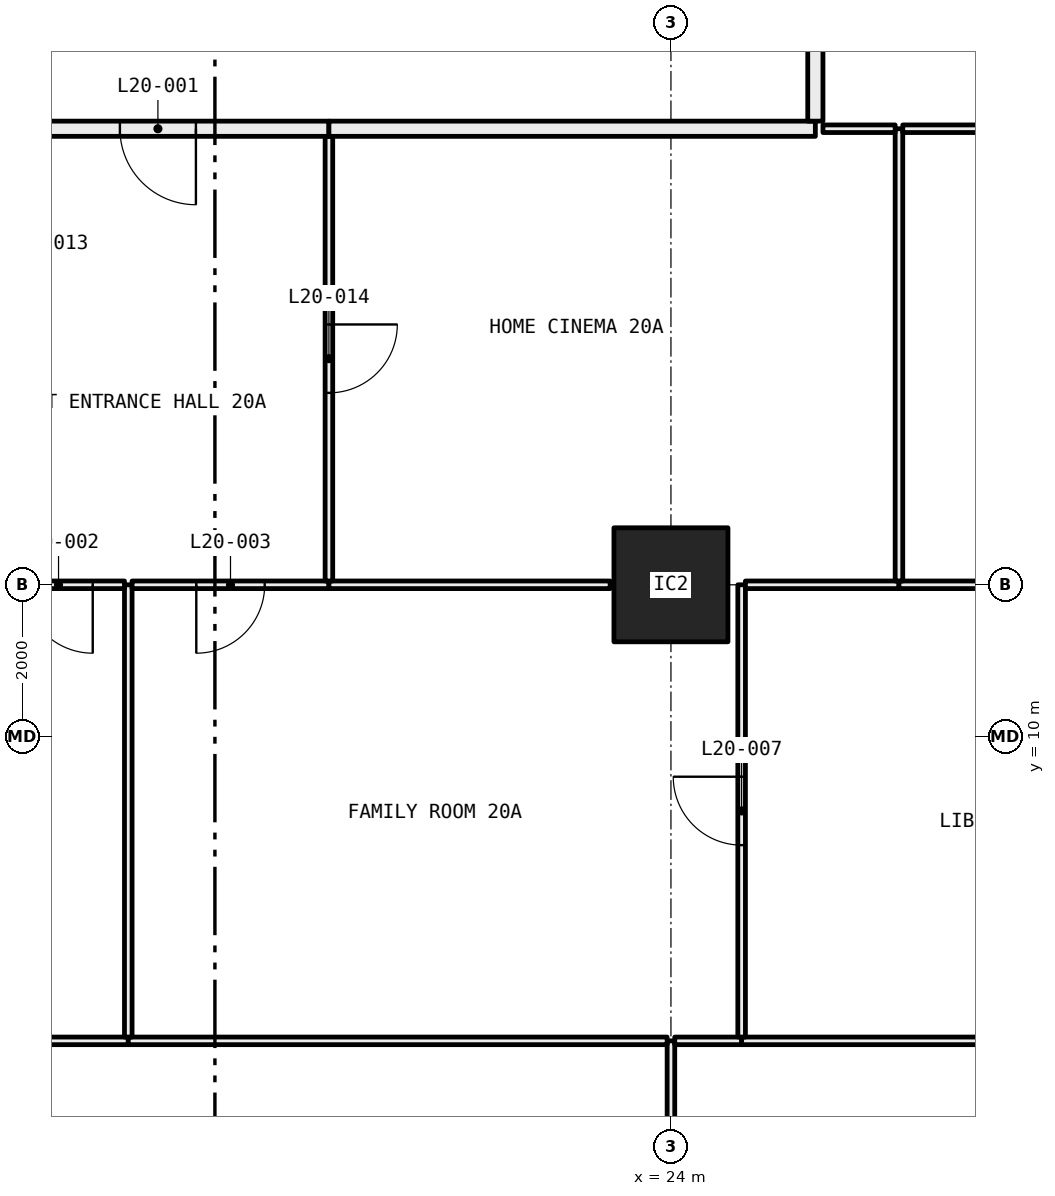
"""IFC4 building model, lengths in metres.
Left out: names, types, materials, properties, quantities, classifications, styles, units other than length and angle.
Written with IfcOpenShell. Run it as: python <this file> out.ifc"""

import sys

from ifc_helpers import new_model, si_unit, direction, frame, frame_2d, origin, origin_2d, place, context, subcontext, project, spatial, rectangle, hollow_rectangle, extrude, element, fill, save


model = new_model("IFC4")
c1 = context("Model", 3, precision=1e-05, world=origin(), true_north=direction((0.0, 1.0)))
c2 = subcontext(c1, "Body", "Model", "MODEL_VIEW")
j1 = project(units=[si_unit("LENGTHUNIT", "METRE"), si_unit("PLANEANGLEUNIT", "RADIAN")], contexts=[c1])
p1 = place(None, origin())
s1 = spatial("IfcSite", under=j1, at=p1, CompositionType="ELEMENT")
p2 = place(p1, origin())
s2 = spatial("IfcBuilding", under=s1, at=p2, CompositionType="ELEMENT")
p3 = place(p2, frame((0.0, 0.0, 81.75)))
s3 = spatial("IfcBuildingStorey", under=s2, at=p3, CompositionType="ELEMENT", Elevation=81.75)
p4 = place(p3, frame((24.0, 12.0, 0.0), z_axis=(0.0, 0.0, 1.0), x_axis=(1.0, 0.0, 0.0)))
e1 = element("IfcColumn", 1, at=p4, inside=s3, PredefinedType="COLUMN", context=c2, shape_type="SweptSolid", body=[
    extrude(hollow_rectangle(XDim=1.5, YDim=1.5, WallThickness=0.065, at=origin_2d()), origin(), (0.0, 0.0, 1.0), 3.05),
])
p5 = place(p3, frame((24.0, 0.72, 0.0), z_axis=(0.0, 0.0, 1.0), x_axis=(0.0, 1.0, 0.0)))
e2 = element("IfcWall", 2, at=p5, inside=s3, PredefinedType="PARTITIONING", context=c2, shape_type="SweptSolid", body=[
    extrude(rectangle(XDim=5.28, YDim=0.1, at=frame_2d((2.64, 0.0))), origin(), (0.0, 0.0, 1.0), 2.45),
])
p6 = place(p5, frame((2.19, 0.0, 0.0)))
e3 = element("IfcOpeningElement", 3, at=p6, cuts=e2, PredefinedType="OPENING", context=c2, shape_type="SweptSolid", body=[
    extrude(rectangle(XDim=0.9, YDim=2.1, at=frame_2d((0.45, 1.05))), frame((0.0, 0.06, 0.0), z_axis=(0.0, -1.0, 0.0), x_axis=(1.0, 0.0, 0.0)), (0.0, 0.0, 1.0), 0.12),
])
p7 = place(p3, frame((16.86, 6.0, 0.0), z_axis=(0.0, 0.0, 1.0), x_axis=(-1.0, 0.0, 0.0)))
e4 = element("IfcWall", 4, at=p7, inside=s3, PredefinedType="PARTITIONING", context=c2, shape_type="SweptSolid", body=[
    extrude(rectangle(XDim=4.81, YDim=0.1, at=frame_2d((2.405, 0.0))), origin(), (0.0, 0.0, 1.0), 2.45),
])
p8 = place(p7, frame((1.955, 0.0, 0.0)))
e5 = element("IfcOpeningElement", 5, at=p8, cuts=e4, PredefinedType="OPENING", context=c2, shape_type="SweptSolid", body=[
    extrude(rectangle(XDim=0.9, YDim=2.1, at=frame_2d((0.45, 1.05))), frame((0.0, 0.06, 0.0), z_axis=(0.0, -1.0, 0.0), x_axis=(1.0, 0.0, 0.0)), (0.0, 0.0, 1.0), 0.12),
])
p9 = place(p3, frame((23.95, 6.0, 0.0), z_axis=(0.0, 0.0, 1.0), x_axis=(-1.0, 0.0, 0.0)))
e6 = element("IfcWall", 6, at=p9, inside=s3, PredefinedType="PARTITIONING", context=c2, shape_type="SweptSolid", body=[
    extrude(rectangle(XDim=7.09, YDim=0.1, at=frame_2d((3.545, 0.0))), origin(), (0.0, 0.0, 1.0), 2.45),
])
p10 = place(p3, frame((24.93, 6.0, 0.0), z_axis=(0.0, 0.0, 1.0), x_axis=(-1.0, 0.0, 0.0)))
e7 = element("IfcWall", 7, at=p10, inside=s3, PredefinedType="PARTITIONING", context=c2, shape_type="SweptSolid", body=[
    extrude(rectangle(XDim=0.88, YDim=0.1, at=frame_2d((0.44, 0.0))), origin(), (0.0, 0.0, 1.0), 2.45),
])
p11 = place(p3, frame((29.95, 6.0, 0.0), z_axis=(0.0, 0.0, 1.0), x_axis=(-1.0, 0.0, 0.0)))
e8 = element("IfcWall", 8, at=p11, inside=s3, PredefinedType="PARTITIONING", context=c2, shape_type="SweptSolid", body=[
    extrude(rectangle(XDim=5.02, YDim=0.1, at=frame_2d((2.51, 0.0))), origin(), (0.0, 0.0, 1.0), 3.05),
])
p12 = place(p3, frame((16.86, 6.05, 0.0), z_axis=(0.0, 0.0, 1.0), x_axis=(0.0, 1.0, 0.0)))
e9 = element("IfcWall", 9, at=p12, inside=s3, PredefinedType="PARTITIONING", context=c2, shape_type="SweptSolid", body=[
    extrude(rectangle(XDim=5.95, YDim=0.1, at=frame_2d((2.975, 0.0))), origin(), (0.0, 0.0, 1.0), 2.45),
])
p13 = place(p3, frame((16.81, 12.0, 0.0), z_axis=(0.0, 0.0, 1.0), x_axis=(-1.0, 0.0, 0.0)))
e10 = element("IfcWall", 10, at=p13, inside=s3, PredefinedType="PARTITIONING", context=c2, shape_type="SweptSolid", body=[
    extrude(rectangle(XDim=1.735, YDim=0.1, at=frame_2d((0.868, 0.0))), origin(), (0.0, 0.0, 1.0), 2.45),
])
p14 = place(p13, frame((0.417, 0.0, 0.0)))
e11 = element("IfcOpeningElement", 11, at=p14, cuts=e10, PredefinedType="OPENING", context=c2, shape_type="SweptSolid", body=[
    extrude(rectangle(XDim=0.9, YDim=2.1, at=frame_2d((0.45, 1.05))), frame((0.0, 0.06, 0.0), z_axis=(0.0, -1.0, 0.0), x_axis=(1.0, 0.0, 0.0)), (0.0, 0.0, 1.0), 0.12),
])
p15 = place(p3, frame((24.93, 6.05, 0.0), z_axis=(0.0, 0.0, 1.0), x_axis=(0.0, 1.0, 0.0)))
e12 = element("IfcWall", 12, at=p15, inside=s3, PredefinedType="PARTITIONING", context=c2, shape_type="SweptSolid", body=[
    extrude(rectangle(XDim=5.95, YDim=0.1, at=frame_2d((2.975, 0.0))), origin(), (0.0, 0.0, 1.0), 2.45),
])
p16 = place(p15, frame((2.525, 0.0, 0.0)))
e13 = element("IfcOpeningElement", 13, at=p16, cuts=e12, PredefinedType="OPENING", context=c2, shape_type="SweptSolid", body=[
    extrude(rectangle(XDim=0.9, YDim=2.1, at=frame_2d((0.45, 1.05))), frame((0.0, 0.06, 0.0), z_axis=(0.0, -1.0, 0.0), x_axis=(1.0, 0.0, 0.0)), (0.0, 0.0, 1.0), 0.12),
])
p17 = place(p3, frame((19.5, 12.0, 0.0), z_axis=(0.0, 0.0, 1.0), x_axis=(-1.0, 0.0, 0.0)))
e14 = element("IfcWall", 14, at=p17, inside=s3, PredefinedType="PARTITIONING", context=c2, shape_type="SweptSolid", body=[
    extrude(rectangle(XDim=2.59, YDim=0.1, at=frame_2d((1.295, 0.0))), origin(), (0.0, 0.0, 1.0), 2.45),
])
p18 = place(p17, frame((0.845, 0.0, 0.0)))
e15 = element("IfcOpeningElement", 15, at=p18, cuts=e14, PredefinedType="OPENING", context=c2, shape_type="SweptSolid", body=[
    extrude(rectangle(XDim=0.9, YDim=2.1, at=frame_2d((0.45, 1.05))), frame((0.0, 0.06, 0.0), z_axis=(0.0, -1.0, 0.0), x_axis=(1.0, 0.0, 0.0)), (0.0, 0.0, 1.0), 0.12),
])
p19 = place(p3, frame((23.2, 12.0, 0.0), z_axis=(0.0, 0.0, 1.0), x_axis=(-1.0, 0.0, 0.0)))
e16 = element("IfcWall", 16, at=p19, inside=s3, PredefinedType="PARTITIONING", context=c2, shape_type="SweptSolid", body=[
    extrude(rectangle(XDim=3.7, YDim=0.1, at=frame_2d((1.85, 0.0))), origin(), (0.0, 0.0, 1.0), 2.45),
])
p20 = place(p3, frame((27.0, 12.0, 0.0), z_axis=(0.0, 0.0, 1.0), x_axis=(-1.0, 0.0, 0.0)))
e17 = element("IfcWall", 17, at=p20, inside=s3, PredefinedType="PARTITIONING", context=c2, shape_type="SweptSolid", body=[
    extrude(rectangle(XDim=2.02, YDim=0.1, at=frame_2d((1.01, 0.0))), origin(), (0.0, 0.0, 1.0), 2.45),
])
p21 = place(p3, frame((32.95, 12.0, 0.0), z_axis=(0.0, 0.0, 1.0), x_axis=(-1.0, 0.0, 0.0)))
e18 = element("IfcWall", 18, at=p21, inside=s3, PredefinedType="PARTITIONING", context=c2, shape_type="SweptSolid", body=[
    extrude(rectangle(XDim=5.95, YDim=0.1, at=frame_2d((2.975, 0.0))), origin(), (0.0, 0.0, 1.0), 2.45),
])
p22 = place(p21, frame((2.525, 0.0, 0.0)))
e19 = element("IfcOpeningElement", 19, at=p22, cuts=e18, PredefinedType="OPENING", context=c2, shape_type="SweptSolid", body=[
    extrude(rectangle(XDim=0.9, YDim=2.1, at=frame_2d((0.45, 1.05))), frame((0.0, 0.06, 0.0), z_axis=(0.0, -1.0, 0.0), x_axis=(1.0, 0.0, 0.0)), (0.0, 0.0, 1.0), 0.12),
])
p23 = place(p3, frame((19.5, 12.05, 0.0), z_axis=(0.0, 0.0, 1.0), x_axis=(0.0, 1.0, 0.0)))
e20 = element("IfcWall", 20, at=p23, inside=s3, PredefinedType="PARTITIONING", context=c2, shape_type="SweptSolid", body=[
    extrude(rectangle(XDim=5.85, YDim=0.1, at=frame_2d((2.925, 0.0))), origin(), (0.0, 0.0, 1.0), 2.45),
])
p24 = place(p23, frame((2.475, 0.0, 0.0)))
e21 = element("IfcOpeningElement", 21, at=p24, cuts=e20, PredefinedType="OPENING", context=c2, shape_type="SweptSolid", body=[
    extrude(rectangle(XDim=0.9, YDim=2.1, at=frame_2d((0.45, 1.05))), frame((0.0, 0.06, 0.0), z_axis=(0.0, -1.0, 0.0), x_axis=(1.0, 0.0, 0.0)), (0.0, 0.0, 1.0), 0.12),
])
p25 = place(p3, frame((19.5, 18.0, 0.0), z_axis=(0.0, 0.0, 1.0), x_axis=(-1.0, 0.0, 0.0)))
e22 = element("IfcWall", 22, at=p25, inside=s3, PredefinedType="PARTITIONING", context=c2, shape_type="SweptSolid", body=[
    extrude(rectangle(XDim=4.5, YDim=0.2, at=frame_2d((2.25, 0.0))), origin(), (0.0, 0.0, 1.0), 3.05),
])
p26 = place(p25, frame((1.75, 0.0, 0.0)))
e23 = element("IfcOpeningElement", 23, at=p26, cuts=e22, PredefinedType="OPENING", context=c2, shape_type="SweptSolid", body=[
    extrude(rectangle(XDim=1.0, YDim=2.1, at=frame_2d((0.5, 1.05))), frame((0.0, 0.11, 0.0), z_axis=(0.0, -1.0, 0.0), x_axis=(1.0, 0.0, 0.0)), (0.0, 0.0, 1.0), 0.22),
])
p27 = place(p3, frame((27.0, 12.05, 0.0), z_axis=(0.0, 0.0, 1.0), x_axis=(0.0, 1.0, 0.0)))
e24 = element("IfcWall", 24, at=p27, inside=s3, PredefinedType="PARTITIONING", context=c2, shape_type="SweptSolid", body=[
    extrude(rectangle(XDim=5.95, YDim=0.1, at=frame_2d((2.975, 0.0))), origin(), (0.0, 0.0, 1.0), 2.45),
])
p28 = place(p3, frame((26.95, 18.0, 0.0), z_axis=(0.0, 0.0, 1.0), x_axis=(-1.0, 0.0, 0.0)))
e25 = element("IfcWall", 25, at=p28, inside=s3, PredefinedType="PARTITIONING", context=c2, shape_type="SweptSolid", body=[
    extrude(rectangle(XDim=0.95, YDim=0.1, at=frame_2d((0.475, 0.0))), origin(), (0.0, 0.0, 1.0), 3.05),
])
p29 = place(p3, frame((25.9, 18.0, 0.0), z_axis=(0.0, 0.0, 1.0), x_axis=(-1.0, 0.0, 0.0)))
e26 = element("IfcWall", 26, at=p29, inside=s3, PredefinedType="PARTITIONING", context=c2, shape_type="SweptSolid", body=[
    extrude(rectangle(XDim=6.4, YDim=0.2, at=frame_2d((3.2, 0.0))), origin(), (0.0, 0.0, 1.0), 3.05),
])
p30 = place(p3, frame((30.0, 18.0, 0.0), z_axis=(0.0, 0.0, 1.0), x_axis=(-1.0, 0.0, 0.0)))
e27 = element("IfcWall", 27, at=p30, inside=s3, PredefinedType="PARTITIONING", context=c2, shape_type="SweptSolid", body=[
    extrude(rectangle(XDim=2.95, YDim=0.1, at=frame_2d((1.475, 0.0))), origin(), (0.0, 0.0, 1.0), 3.05),
])
p31 = place(p30, frame((1.025, 0.0, 0.0)))
e28 = element("IfcOpeningElement", 28, at=p31, cuts=e27, PredefinedType="OPENING", context=c2, shape_type="SweptSolid", body=[
    extrude(rectangle(XDim=0.9, YDim=2.1, at=frame_2d((0.45, 1.05))), frame((0.0, 0.06, 0.0), z_axis=(0.0, -1.0, 0.0), x_axis=(1.0, 0.0, 0.0)), (0.0, 0.0, 1.0), 0.12),
])
p32 = place(p3, frame((25.9, 23.9, 0.0), z_axis=(0.0, 0.0, 1.0), x_axis=(0.0, -1.0, 0.0)))
e29 = element("IfcWall", 29, at=p32, inside=s3, PredefinedType="PARTITIONING", context=c2, shape_type="SweptSolid", body=[
    extrude(rectangle(XDim=5.8, YDim=0.2, at=frame_2d((2.9, 0.0))), origin(), (0.0, 0.0, 1.0), 3.05),
])
p33 = place(p26, origin())
e30 = element("IfcDoor", 30, at=p33, inside=s3, OperationType="SINGLE_SWING_RIGHT", PredefinedType="DOOR", context=c2, shape_type="SweptSolid", body=[
    extrude(rectangle(XDim=1.0, YDim=2.1, at=frame_2d((0.5, 1.05))), frame((0.0, 0.025, 0.0), z_axis=(0.0, -1.0, 0.0), x_axis=(1.0, 0.0, 0.0)), (0.0, 0.0, 1.0), 0.05),
])
fill(e23, e30)
p34 = place(p14, origin())
e31 = element("IfcDoor", 31, at=p34, inside=s3, OperationType="SINGLE_SWING_RIGHT", PredefinedType="DOOR", context=c2, shape_type="SweptSolid", body=[
    extrude(rectangle(XDim=0.9, YDim=2.1, at=frame_2d((0.45, 1.05))), frame((0.0, 0.025, 0.0), z_axis=(0.0, -1.0, 0.0), x_axis=(1.0, 0.0, 0.0)), (0.0, 0.0, 1.0), 0.05),
])
fill(e11, e31)
p35 = place(p18, origin())
e32 = element("IfcDoor", 32, at=p35, inside=s3, OperationType="SINGLE_SWING_LEFT", PredefinedType="DOOR", context=c2, shape_type="SweptSolid", body=[
    extrude(rectangle(XDim=0.9, YDim=2.1, at=frame_2d((0.45, 1.05))), frame((0.0, 0.025, 0.0), z_axis=(0.0, -1.0, 0.0), x_axis=(1.0, 0.0, 0.0)), (0.0, 0.0, 1.0), 0.05),
])
fill(e15, e32)
p36 = place(p16, origin())
e33 = element("IfcDoor", 33, at=p36, inside=s3, OperationType="SINGLE_SWING_LEFT", PredefinedType="DOOR", context=c2, shape_type="SweptSolid", body=[
    extrude(rectangle(XDim=0.9, YDim=2.1, at=frame_2d((0.45, 1.05))), frame((0.0, 0.025, 0.0), z_axis=(0.0, -1.0, 0.0), x_axis=(1.0, 0.0, 0.0)), (0.0, 0.0, 1.0), 0.05),
])
fill(e13, e33)
p37 = place(p24, frame((0.9, 0.0, 0.0), x_axis=(-1.0, 0.0, 0.0)))
e34 = element("IfcDoor", 34, at=p37, inside=s3, OperationType="SINGLE_SWING_RIGHT", PredefinedType="DOOR", context=c2, shape_type="SweptSolid", body=[
    extrude(rectangle(XDim=0.9, YDim=2.1, at=frame_2d((0.45, 1.05))), frame((0.0, 0.025, 0.0), z_axis=(0.0, -1.0, 0.0), x_axis=(1.0, 0.0, 0.0)), (0.0, 0.0, 1.0), 0.05),
])
fill(e21, e34)
save(model, sys.argv[1])
